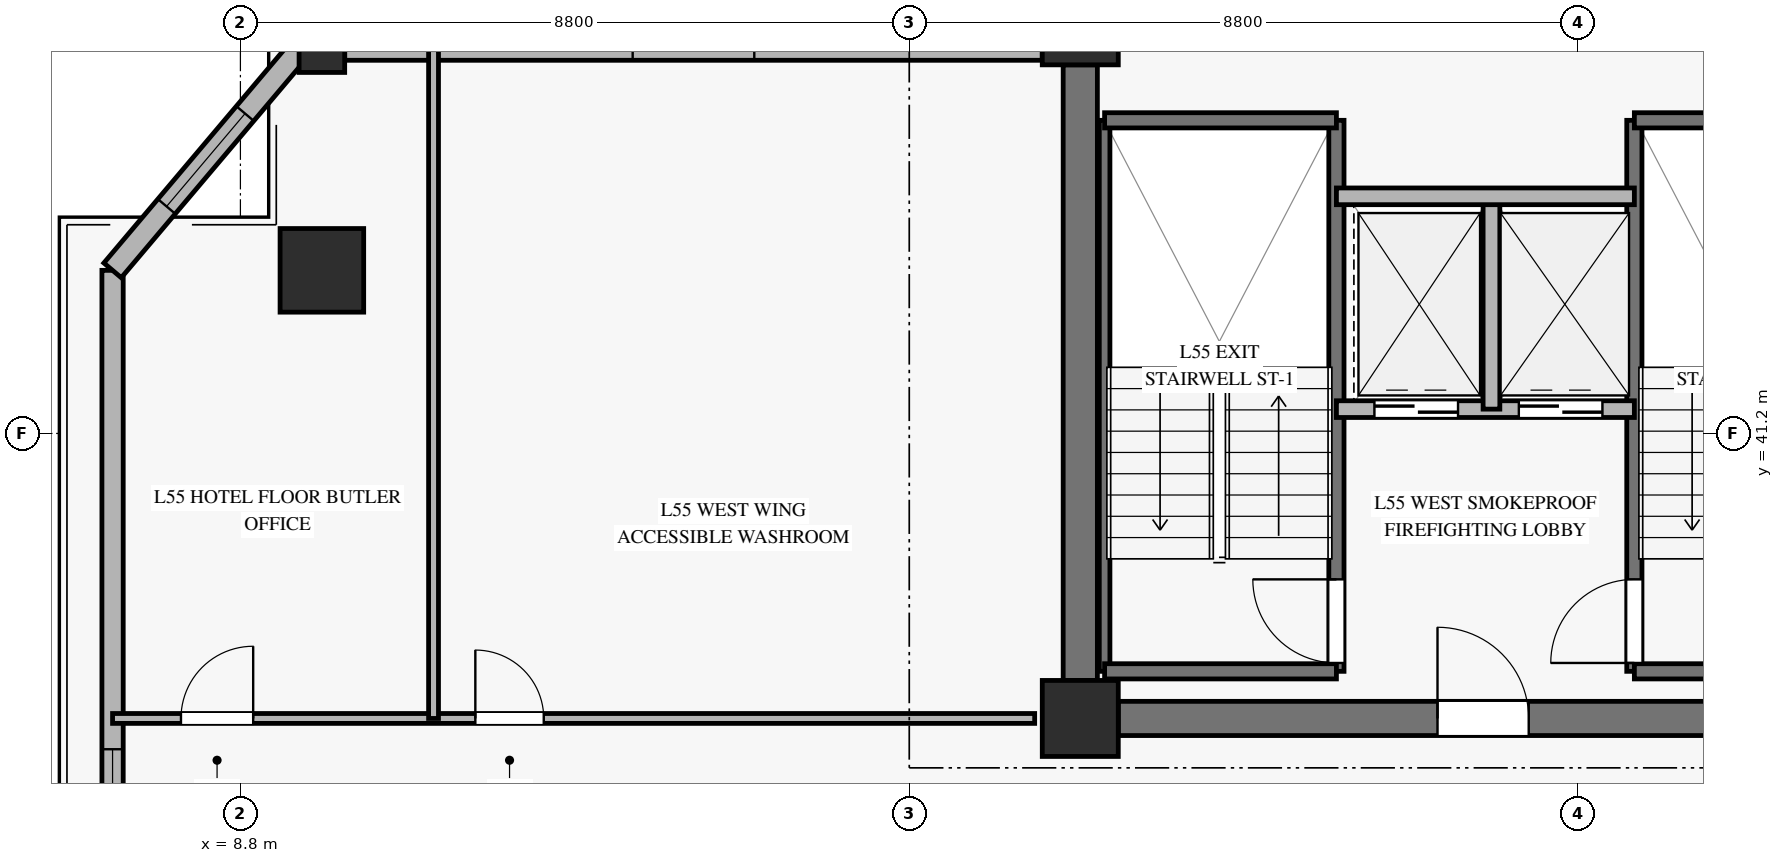
"""IFC4 building model, lengths in metres.
Left out: names, types, materials, properties, quantities, classifications, styles, units other than length and angle.
Written with IfcOpenShell. Run it as: python <this file> out.ifc"""

import sys

from ifc_helpers import new_model, si_unit, direction, frame, frame_2d, origin, origin_2d, place, context, subcontext, project, spatial, rectangle, hollow_rectangle, extrude, source, transform, mapped, element, fill, save


model = new_model("IFC4")
c1 = context("Model", 3, precision=1e-05, world=origin(), true_north=direction((0.0, 1.0)))
c2 = subcontext(c1, "Body", "Model", "MODEL_VIEW")
j1 = project(units=[si_unit("LENGTHUNIT", "METRE"), si_unit("PLANEANGLEUNIT", "RADIAN")], contexts=[c1])
p1 = place(None, origin())
s1 = spatial("IfcSite", under=j1, at=p1, CompositionType="ELEMENT")
p2 = place(p1, origin())
s2 = spatial("IfcBuilding", under=s1, at=p2, CompositionType="ELEMENT")
p3 = place(p2, frame((0.0, 0.0, 216.7)))
s3 = spatial("IfcBuildingStorey", under=s2, at=p3, CompositionType="ELEMENT", Elevation=216.7)
m1 = source(origin(), c2, "Body", "SweptSolid", [
    extrude(rectangle(XDim=1.0, YDim=1.0, at=origin_2d()), origin(), (0.0, 0.0, 1.0), 3.24),
])
for number, where, z_axis, x_axis in (
    (1, (19.85, 37.45, 0.0), (0.0, 0.0, 1.0), (1.0, 0.0, 0.0)),
    (2, (19.85, 46.55, 0.0), (0.0, 0.0, 1.0), (1.0, 0.0, 0.0)),
):
    element("IfcColumn", number, at=place(p3, frame(where, z_axis=z_axis, x_axis=x_axis)), inside=s3, PredefinedType="PILASTER", context=c2, shape_type="MappedRepresentation", body=[
        mapped(m1, transform((0.0, 0.0, 0.0), x_axis=(1.0, 0.0, 0.0), y_axis=(0.0, 1.0, 0.0), z_axis=(0.0, 0.0, 1.0), scale=1.0)),
    ])
p4 = place(p3, frame((20.35, 37.45, 0.0), z_axis=(0.0, 0.0, 1.0), x_axis=(1.0, 0.0, 0.0)))
e3 = element("IfcWall", 3, at=p4, inside=s3, PredefinedType="SHEAR", context=c2, shape_type="SweptSolid", body=[
    extrude(rectangle(XDim=9.95, YDim=0.45, at=frame_2d((4.975, 0.0))), origin(), (0.0, 0.0, 1.0), 3.24),
])
p5 = place(p4, frame((4.2, 0.0, 0.0)))
e4 = element("IfcOpeningElement", 4, at=p5, cuts=e3, PredefinedType="OPENING", context=c2, shape_type="SweptSolid", body=[
    extrude(rectangle(XDim=1.2, YDim=2.15, at=frame_2d((0.6, 1.075))), frame((0.0, 0.235, 0.0), z_axis=(0.0, -1.0, 0.0), x_axis=(1.0, 0.0, 0.0)), (0.0, 0.0, 1.0), 0.47),
])
p6 = place(p3, frame((19.85, 37.95, 0.0), z_axis=(0.0, 0.0, 1.0), x_axis=(0.0, 1.0, 0.0)))
e5 = element("IfcWall", 5, at=p6, inside=s3, PredefinedType="SHEAR", context=c2, shape_type="SweptSolid", body=[
    extrude(rectangle(XDim=8.1, YDim=0.45, at=frame_2d((4.05, 0.0))), origin(), (0.0, 0.0, 1.0), 3.24),
])
m2 = source(origin(), c2, "Body", "SweptSolid", [
    extrude(hollow_rectangle(XDim=1.1, YDim=1.1, WallThickness=0.05, at=origin_2d()), origin(), (0.0, 0.0, 1.0), 3.24),
])
p7 = place(p3, frame((9.872, 43.346, 0.0), z_axis=(0.0, 0.0, 1.0), x_axis=(1.0, 0.0, 0.0)))
e6 = element("IfcColumn", 6, at=p7, inside=s3, PredefinedType="COLUMN", context=c2, shape_type="MappedRepresentation", body=[
    mapped(m2, transform((0.0, 0.0, 0.0), x_axis=(1.0, 0.0, 0.0), y_axis=(0.0, 1.0, 0.0), z_axis=(0.0, 0.0, 1.0), scale=1.0)),
])
m3 = source(origin(), c2, "Body", "SweptSolid", [
    extrude(hollow_rectangle(XDim=0.6, YDim=0.6, WallThickness=0.028, at=origin_2d()), origin(), (0.0, 0.0, 1.0), 3.24),
])
p8 = place(p3, frame((9.872, 46.25, 0.0), z_axis=(0.0, 0.0, 1.0), x_axis=(1.0, 0.0, 0.0)))
e7 = element("IfcColumn", 7, at=p8, inside=s3, PredefinedType="COLUMN", context=c2, shape_type="MappedRepresentation", body=[
    mapped(m3, transform((0.0, 0.0, 0.0), x_axis=(1.0, 0.0, 0.0), y_axis=(0.0, 1.0, 0.0), z_axis=(0.0, 0.0, 1.0), scale=1.0)),
])
p9 = place(p3, frame((7.118, 29.509, 0.0), z_axis=(0.0, 0.0, 1.0), x_axis=(0.0, 1.0, 0.0)))
e8 = element("IfcWall", 8, at=p9, inside=s3, PredefinedType="SOLIDWALL", context=c2, shape_type="SweptSolid", body=[
    extrude(rectangle(XDim=13.837, YDim=0.28, at=frame_2d((6.918, 0.0))), origin(), (0.0, 0.0, 1.0), 2.72),
])
p10 = place(p9, frame((5.536, 0.0, 0.45)))
e9 = element("IfcOpeningElement", 9, at=p10, cuts=e8, PredefinedType="OPENING", context=c2, shape_type="SweptSolid", body=[
    extrude(rectangle(XDim=2.0, YDim=2.0, at=frame_2d((1.0, 1.0))), frame((0.0, 0.15, 0.0), z_axis=(0.0, -1.0, 0.0), x_axis=(1.0, 0.0, 0.0)), (0.0, 0.0, 1.0), 0.3),
])
p11 = place(p3, frame((10.172, 46.25, 0.0), z_axis=(0.0, 0.0, 1.0), x_axis=(1.0, 0.0, 0.0)))
e10 = element("IfcWall", 10, at=p11, inside=s3, PredefinedType="SOLIDWALL", context=c2, shape_type="SweptSolid", body=[
    extrude(rectangle(XDim=9.178, YDim=0.28, at=frame_2d((4.589, 0.0))), origin(), (0.0, 0.0, 1.0), 2.72),
])
p12 = place(p11, frame((3.789, 0.0, 0.45)))
e11 = element("IfcOpeningElement", 11, at=p12, cuts=e10, PredefinedType="OPENING", context=c2, shape_type="SweptSolid", body=[
    extrude(rectangle(XDim=1.6, YDim=2.0, at=frame_2d((0.8, 1.0))), frame((0.0, 0.15, 0.0), z_axis=(0.0, -1.0, 0.0), x_axis=(1.0, 0.0, 0.0)), (0.0, 0.0, 1.0), 0.3),
])
p13 = place(p3, frame((9.572, 46.25, 0.0), z_axis=(0.0, 0.0, 1.0), x_axis=(-0.645455651603, -0.763797749286, 0.0)))
e12 = element("IfcWall", 12, at=p13, inside=s3, PredefinedType="SOLIDWALL", context=c2, shape_type="SweptSolid", body=[
    extrude(rectangle(XDim=3.802, YDim=0.3, at=frame_2d((1.901, 0.0))), origin(), (0.0, 0.0, 1.0), 2.72),
])
p14 = place(p13, frame((1.101, 0.0, 0.45)))
e13 = element("IfcOpeningElement", 13, at=p14, cuts=e12, PredefinedType="OPENING", context=c2, shape_type="SweptSolid", body=[
    extrude(rectangle(XDim=1.6, YDim=2.0, at=frame_2d((0.8, 1.0))), frame((0.0, 0.16, 0.0), z_axis=(0.0, -1.0, 0.0), x_axis=(1.0, 0.0, 0.0)), (0.0, 0.0, 1.0), 0.32),
])
p15 = place(p3, frame((20.17, 38.07, 0.0), z_axis=(0.0, 0.0, 1.0), x_axis=(0.0, 1.0, 0.0)))
e14 = element("IfcWall", 14, at=p15, inside=s3, PredefinedType="SOLIDWALL", context=c2, shape_type="SweptSolid", body=[
    extrude(rectangle(XDim=7.25, YDim=0.14, at=frame_2d((3.625, 0.0))), origin(), (0.0, 0.0, 1.0), 3.5),
])
p16 = place(p3, frame((23.22, 38.07, 0.0), z_axis=(0.0, 0.0, 1.0), x_axis=(0.0, 1.0, 0.0)))
e15 = element("IfcWall", 15, at=p16, inside=s3, PredefinedType="SOLIDWALL", context=c2, shape_type="SweptSolid", body=[
    extrude(rectangle(XDim=7.25, YDim=0.2, at=frame_2d((3.625, 0.0))), origin(), (0.0, 0.0, 1.0), 3.5),
])
p17 = place(p16, frame((0.11, 0.0, 0.0)))
e16 = element("IfcOpeningElement", 16, at=p17, cuts=e15, PredefinedType="OPENING", context=c2, shape_type="SweptSolid", body=[
    extrude(rectangle(XDim=1.1, YDim=2.15, at=frame_2d((0.55, 1.075))), frame((0.0, 0.11, 0.0), z_axis=(0.0, -1.0, 0.0), x_axis=(1.0, 0.0, 0.0)), (0.0, 0.0, 1.0), 0.22),
])
for number, where, z_axis, x_axis in (
    (17, (20.17, 45.32, 0.0), (0.0, 0.0, 1.0), (1.0, 0.0, 0.0)),
    (18, (20.17, 38.07, 0.0), (0.0, 0.0, 1.0), (1.0, 0.0, 0.0)),
):
    element("IfcWall", number, at=place(p3, frame(where, z_axis=z_axis, x_axis=x_axis)), inside=s3, PredefinedType="SOLIDWALL", context=c2, shape_type="SweptSolid", body=[
        extrude(rectangle(XDim=3.05, YDim=0.2, at=frame_2d((1.525, 0.0))), origin(), (0.0, 0.0, 1.0), 3.5),
    ])
p18 = place(p3, frame((27.14, 38.07, 0.0), z_axis=(0.0, 0.0, 1.0), x_axis=(0.0, 1.0, 0.0)))
e19 = element("IfcWall", 19, at=p18, inside=s3, PredefinedType="SOLIDWALL", context=c2, shape_type="SweptSolid", body=[
    extrude(rectangle(XDim=7.25, YDim=0.2, at=frame_2d((3.625, 0.0))), origin(), (0.0, 0.0, 1.0), 3.5),
])
p19 = place(p18, frame((0.11, 0.0, 0.0)))
e20 = element("IfcOpeningElement", 20, at=p19, cuts=e19, PredefinedType="OPENING", context=c2, shape_type="SweptSolid", body=[
    extrude(rectangle(XDim=1.1, YDim=2.15, at=frame_2d((0.55, 1.075))), frame((0.0, 0.11, 0.0), z_axis=(0.0, -1.0, 0.0), x_axis=(1.0, 0.0, 0.0)), (0.0, 0.0, 1.0), 0.22),
])
for number, where, z_axis, x_axis in (
    (21, (27.14, 45.32, 0.0), (0.0, 0.0, 1.0), (1.0, 0.0, 0.0)),
    (22, (27.14, 38.07, 0.0), (0.0, 0.0, 1.0), (1.0, 0.0, 0.0)),
):
    element("IfcWall", number, at=place(p3, frame(where, z_axis=z_axis, x_axis=x_axis)), inside=s3, PredefinedType="SOLIDWALL", context=c2, shape_type="SweptSolid", body=[
        extrude(rectangle(XDim=3.08, YDim=0.2, at=frame_2d((1.54, 0.0))), origin(), (0.0, 0.0, 1.0), 3.5),
    ])
p20 = place(p3, frame((23.22, 41.52, 0.0), z_axis=(0.0, 0.0, 1.0), x_axis=(1.0, 0.0, 0.0)))
e23 = element("IfcWall", 23, at=p20, inside=s3, PredefinedType="SOLIDWALL", context=c2, shape_type="SweptSolid", body=[
    extrude(rectangle(XDim=3.92, YDim=0.22, at=frame_2d((1.96, 0.0))), origin(), (0.0, 0.0, 1.0), 3.24),
])
p21 = place(p20, frame((0.5, 0.0, 0.0)))
e24 = element("IfcOpeningElement", 24, at=p21, cuts=e23, PredefinedType="OPENING", context=c2, shape_type="SweptSolid", body=[
    extrude(rectangle(XDim=1.1, YDim=2.2, at=frame_2d((0.55, 1.1))), frame((0.0, 0.12, 0.0), z_axis=(0.0, -1.0, 0.0), x_axis=(1.0, 0.0, 0.0)), (0.0, 0.0, 1.0), 0.24),
])
p22 = place(p20, frame((2.4, 0.0, 0.0)))
e25 = element("IfcOpeningElement", 25, at=p22, cuts=e23, PredefinedType="OPENING", context=c2, shape_type="SweptSolid", body=[
    extrude(rectangle(XDim=1.1, YDim=2.2, at=frame_2d((0.55, 1.1))), frame((0.0, 0.12, 0.0), z_axis=(0.0, -1.0, 0.0), x_axis=(1.0, 0.0, 0.0)), (0.0, 0.0, 1.0), 0.24),
])
p23 = place(p3, frame((25.26, 41.52, 0.0), z_axis=(0.0, 0.0, 1.0), x_axis=(0.0, 1.0, 0.0)))
e26 = element("IfcWall", 26, at=p23, inside=s3, PredefinedType="SOLIDWALL", context=c2, shape_type="SweptSolid", body=[
    extrude(rectangle(XDim=2.8, YDim=0.22, at=frame_2d((1.4, 0.0))), origin(), (0.0, 0.0, 1.0), 3.24),
])
p24 = place(p3, frame((23.22, 44.32, 0.0), z_axis=(0.0, 0.0, 1.0), x_axis=(1.0, 0.0, 0.0)))
e27 = element("IfcWall", 27, at=p24, inside=s3, PredefinedType="SOLIDWALL", context=c2, shape_type="SweptSolid", body=[
    extrude(rectangle(XDim=3.92, YDim=0.22, at=frame_2d((1.96, 0.0))), origin(), (0.0, 0.0, 1.0), 3.24),
])
p25 = place(p3, frame((7.118, 37.45, 0.0), z_axis=(0.0, 0.0, 1.0), x_axis=(1.0, 0.0, 0.0)))
e28 = element("IfcWall", 28, at=p25, inside=s3, PredefinedType="PARTITIONING", context=c2, shape_type="SweptSolid", body=[
    extrude(rectangle(XDim=12.132, YDim=0.13, at=frame_2d((6.066, 0.0))), origin(), (0.0, 0.0, 1.0), 2.725),
])
p26 = place(p25, frame((0.9, 0.0, 0.0)))
e29 = element("IfcOpeningElement", 29, at=p26, cuts=e28, PredefinedType="OPENING", context=c2, shape_type="SweptSolid", body=[
    extrude(rectangle(XDim=0.95, YDim=2.1, at=frame_2d((0.475, 1.05))), frame((0.0, 0.075, 0.0), z_axis=(0.0, -1.0, 0.0), x_axis=(1.0, 0.0, 0.0)), (0.0, 0.0, 1.0), 0.15),
])
p27 = place(p25, frame((4.773, 0.0, 0.0)))
e30 = element("IfcOpeningElement", 30, at=p27, cuts=e28, PredefinedType="OPENING", context=c2, shape_type="SweptSolid", body=[
    extrude(rectangle(XDim=0.9, YDim=2.1, at=frame_2d((0.45, 1.05))), frame((0.0, 0.075, 0.0), z_axis=(0.0, -1.0, 0.0), x_axis=(1.0, 0.0, 0.0)), (0.0, 0.0, 1.0), 0.15),
])
p28 = place(p3, frame((11.341, 37.45, 0.0), z_axis=(0.0, 0.0, 1.0), x_axis=(0.0, 1.0, 0.0)))
e31 = element("IfcWall", 31, at=p28, inside=s3, PredefinedType="PARTITIONING", context=c2, shape_type="SweptSolid", body=[
    extrude(rectangle(XDim=8.8, YDim=0.13, at=frame_2d((4.4, 0.0))), origin(), (0.0, 0.0, 1.0), 3.24),
])
m4 = source(origin(), c2, "Body", "SweptSolid", [
    extrude(rectangle(XDim=2.0, YDim=2.0, at=frame_2d((1.0, 1.0))), frame((0.0, 0.03, 0.0), z_axis=(0.0, -1.0, 0.0), x_axis=(1.0, 0.0, 0.0)), (0.0, 0.0, 1.0), 0.06),
])
p29 = place(p10, origin())
e32 = element("IfcWindow", 32, at=p29, inside=s3, PartitioningType="SINGLE_PANEL", PredefinedType="WINDOW", context=c2, shape_type="MappedRepresentation", body=[
    mapped(m4, transform((0.0, 0.0, 0.0), x_axis=(1.0, 0.0, 0.0), y_axis=(0.0, 1.0, 0.0), z_axis=(0.0, 0.0, 1.0), scale=1.0)),
])
fill(e9, e32)
m5 = source(origin(), c2, "Body", "SweptSolid", [
    extrude(rectangle(XDim=1.6, YDim=2.0, at=frame_2d((0.8, 1.0))), frame((0.0, 0.03, 0.0), z_axis=(0.0, -1.0, 0.0), x_axis=(1.0, 0.0, 0.0)), (0.0, 0.0, 1.0), 0.06),
])
p30 = place(p14, origin())
e33 = element("IfcWindow", 33, at=p30, inside=s3, PartitioningType="SINGLE_PANEL", PredefinedType="WINDOW", context=c2, shape_type="MappedRepresentation", body=[
    mapped(m5, transform((0.0, 0.0, 0.0), x_axis=(1.0, 0.0, 0.0), y_axis=(0.0, 1.0, 0.0), z_axis=(0.0, 0.0, 1.0), scale=1.0)),
])
fill(e13, e33)
m6 = source(origin(), c2, "Body", "SweptSolid", [
    extrude(rectangle(XDim=1.1, YDim=2.15, at=frame_2d((0.55, 1.075))), frame((0.0, 0.025, 0.0), z_axis=(0.0, -1.0, 0.0), x_axis=(1.0, 0.0, 0.0)), (0.0, 0.0, 1.0), 0.05),
])
p31 = place(p17, origin())
e34 = element("IfcDoor", 34, at=p31, inside=s3, OperationType="SINGLE_SWING_RIGHT", PredefinedType="DOOR", context=c2, shape_type="MappedRepresentation", body=[
    mapped(m6, transform((0.0, 0.0, 0.0), x_axis=(1.0, 0.0, 0.0), y_axis=(0.0, 1.0, 0.0), z_axis=(0.0, 0.0, 1.0), scale=1.0)),
])
fill(e16, e34)
p32 = place(p19, origin())
e35 = element("IfcDoor", 35, at=p32, inside=s3, OperationType="SINGLE_SWING_LEFT", PredefinedType="DOOR", context=c2, shape_type="MappedRepresentation", body=[
    mapped(m6, transform((0.0, 0.0, 0.0), x_axis=(1.0, 0.0, 0.0), y_axis=(0.0, 1.0, 0.0), z_axis=(0.0, 0.0, 1.0), scale=1.0)),
])
fill(e20, e35)
m7 = source(origin(), c2, "Body", "SweptSolid", [
    extrude(rectangle(XDim=1.1, YDim=2.2, at=frame_2d((0.55, 1.1))), frame((0.0, 0.025, 0.0), z_axis=(0.0, -1.0, 0.0), x_axis=(1.0, 0.0, 0.0)), (0.0, 0.0, 1.0), 0.05),
])
p33 = place(p21, origin())
e36 = element("IfcDoor", 36, at=p33, inside=s3, OperationType="SLIDING_TO_LEFT", PredefinedType="DOOR", context=c2, shape_type="MappedRepresentation", body=[
    mapped(m7, transform((0.0, 0.0, 0.0), x_axis=(1.0, 0.0, 0.0), y_axis=(0.0, 1.0, 0.0), z_axis=(0.0, 0.0, 1.0), scale=1.0)),
])
fill(e24, e36)
p34 = place(p22, origin())
e37 = element("IfcDoor", 37, at=p34, inside=s3, OperationType="SLIDING_TO_LEFT", PredefinedType="DOOR", context=c2, shape_type="MappedRepresentation", body=[
    mapped(m7, transform((0.0, 0.0, 0.0), x_axis=(1.0, 0.0, 0.0), y_axis=(0.0, 1.0, 0.0), z_axis=(0.0, 0.0, 1.0), scale=1.0)),
])
fill(e25, e37)
m8 = source(origin(), c2, "Body", "SweptSolid", [
    extrude(rectangle(XDim=1.2, YDim=2.15, at=frame_2d((0.6, 1.075))), frame((0.0, 0.025, 0.0), z_axis=(0.0, -1.0, 0.0), x_axis=(1.0, 0.0, 0.0)), (0.0, 0.0, 1.0), 0.05),
])
p35 = place(p5, origin())
e38 = element("IfcDoor", 38, at=p35, inside=s3, OperationType="SINGLE_SWING_LEFT", PredefinedType="DOOR", context=c2, shape_type="MappedRepresentation", body=[
    mapped(m8, transform((0.0, 0.0, 0.0), x_axis=(1.0, 0.0, 0.0), y_axis=(0.0, 1.0, 0.0), z_axis=(0.0, 0.0, 1.0), scale=1.0)),
])
fill(e4, e38)
m9 = source(origin(), c2, "Body", "SweptSolid", [
    extrude(rectangle(XDim=0.95, YDim=2.1, at=frame_2d((0.475, 1.05))), frame((0.0, 0.025, 0.0), z_axis=(0.0, -1.0, 0.0), x_axis=(1.0, 0.0, 0.0)), (0.0, 0.0, 1.0), 0.05),
])
p36 = place(p26, origin())
e39 = element("IfcDoor", 39, at=p36, inside=s3, OperationType="SINGLE_SWING_RIGHT", PredefinedType="DOOR", context=c2, shape_type="MappedRepresentation", body=[
    mapped(m9, transform((0.0, 0.0, 0.0), x_axis=(1.0, 0.0, 0.0), y_axis=(0.0, 1.0, 0.0), z_axis=(0.0, 0.0, 1.0), scale=1.0)),
])
fill(e29, e39)
m10 = source(origin(), c2, "Body", "SweptSolid", [
    extrude(rectangle(XDim=0.9, YDim=2.1, at=frame_2d((0.45, 1.05))), frame((0.0, 0.025, 0.0), z_axis=(0.0, -1.0, 0.0), x_axis=(1.0, 0.0, 0.0)), (0.0, 0.0, 1.0), 0.05),
])
p37 = place(p27, origin())
e40 = element("IfcDoor", 40, at=p37, inside=s3, OperationType="SINGLE_SWING_LEFT", PredefinedType="DOOR", context=c2, shape_type="MappedRepresentation", body=[
    mapped(m10, transform((0.0, 0.0, 0.0), x_axis=(1.0, 0.0, 0.0), y_axis=(0.0, 1.0, 0.0), z_axis=(0.0, 0.0, 1.0), scale=1.0)),
])
fill(e30, e40)
save(model, sys.argv[1])
